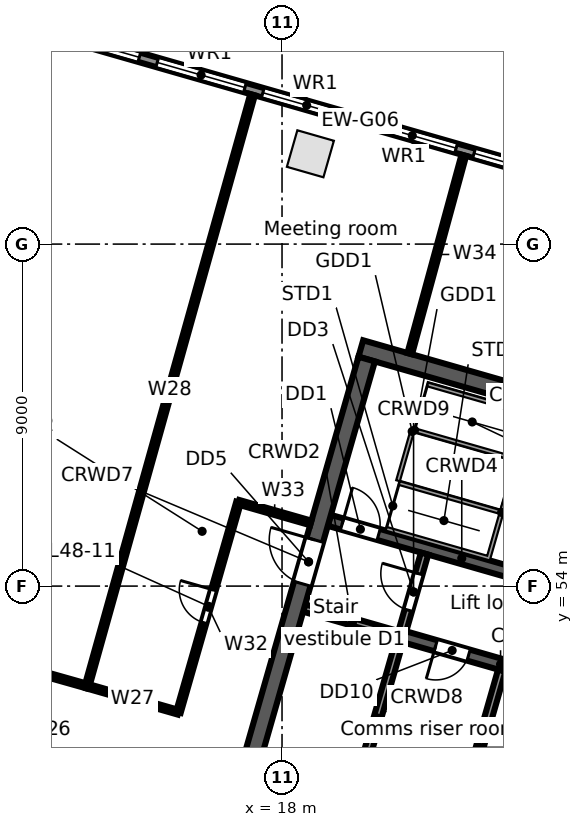
"""IFC4 building model, lengths in metres.
Left out: names, types, materials, properties, quantities, classifications, styles, units other than length and angle.
Written with IfcOpenShell. Run it as: python <this file> out.ifc"""

import sys

from ifc_helpers import new_model, si_unit, direction, frame, frame_2d, origin, origin_2d, place, context, subcontext, project, spatial, rectangle, extrude, element, fill, save


model = new_model("IFC4")
c1 = context("Model", 3, precision=1e-05, world=origin(), true_north=direction((0.0, 1.0)))
c2 = subcontext(c1, "Body", "Model", "MODEL_VIEW")
j1 = project(units=[si_unit("LENGTHUNIT", "METRE"), si_unit("PLANEANGLEUNIT", "RADIAN")], contexts=[c1])
p1 = place(None, origin())
s1 = spatial("IfcSite", under=j1, at=p1, CompositionType="ELEMENT")
p2 = place(p1, origin())
s2 = spatial("IfcBuilding", under=s1, at=p2, CompositionType="ELEMENT")
p3 = place(p2, frame((0.0, 0.0, 223.1)))
s3 = spatial("IfcBuildingStorey", under=s2, at=p3, CompositionType="ELEMENT", Elevation=223.1)
p4 = place(p3, frame((18.746, 65.376, 0.0), z_axis=(0.0, 0.0, 1.0), x_axis=(-0.961261695938, 0.275637355817, 0.0)))
e1 = element("IfcColumn", 1, at=p4, inside=s3, PredefinedType="COLUMN", context=c2, shape_type="SweptSolid", body=[
    extrude(rectangle(XDim=1.0, YDim=1.0, at=origin_2d()), origin(), (0.0, 0.0, 1.0), 3.9),
])
p5 = place(p3, frame((3.34, 71.042, 0.0), z_axis=(0.0, 0.0, 1.0), x_axis=(0.96126179431, -0.275637012753, 0.0)))
e2 = element("IfcWall", 2, at=p5, inside=s3, PredefinedType="STANDARD", context=c2, shape_type="SweptSolid", body=[
    extrude(rectangle(XDim=34.779, YDim=0.25, at=frame_2d((17.39, 0.0))), origin(), (0.0, 0.0, 1.0), 3.62),
])
p6 = place(p5, frame((32.071, 0.0, 0.8)))
e3 = element("IfcOpeningElement", 3, at=p6, cuts=e2, PredefinedType="OPENING", context=c2, shape_type="SweptSolid", body=[
    extrude(rectangle(XDim=2.4, YDim=2.2, at=frame_2d((1.2, 1.1))), frame((0.0, 0.135, 0.0), z_axis=(0.0, -1.0, 0.0), x_axis=(1.0, 0.0, 0.0)), (0.0, 0.0, 1.0), 0.27),
])
p7 = place(p5, frame((29.18, 0.0, 0.8)))
e4 = element("IfcOpeningElement", 4, at=p7, cuts=e2, PredefinedType="OPENING", context=c2, shape_type="SweptSolid", body=[
    extrude(rectangle(XDim=2.4, YDim=2.2, at=frame_2d((1.2, 1.1))), frame((0.0, 0.135, 0.0), z_axis=(0.0, -1.0, 0.0), x_axis=(1.0, 0.0, 0.0)), (0.0, 0.0, 1.0), 0.27),
])
p8 = place(p5, frame((26.289, 0.0, 0.8)))
e5 = element("IfcOpeningElement", 5, at=p8, cuts=e2, PredefinedType="OPENING", context=c2, shape_type="SweptSolid", body=[
    extrude(rectangle(XDim=2.4, YDim=2.2, at=frame_2d((1.2, 1.1))), frame((0.0, 0.135, 0.0), z_axis=(0.0, -1.0, 0.0), x_axis=(1.0, 0.0, 0.0)), (0.0, 0.0, 1.0), 0.27),
])
p9 = place(p5, frame((23.398, 0.0, 0.8)))
e6 = element("IfcOpeningElement", 6, at=p9, cuts=e2, PredefinedType="OPENING", context=c2, shape_type="SweptSolid", body=[
    extrude(rectangle(XDim=2.4, YDim=2.2, at=frame_2d((1.2, 1.1))), frame((0.0, 0.135, 0.0), z_axis=(0.0, -1.0, 0.0), x_axis=(1.0, 0.0, 0.0)), (0.0, 0.0, 1.0), 0.27),
])
p10 = place(p5, frame((20.508, 0.0, 0.8)))
e7 = element("IfcOpeningElement", 7, at=p10, cuts=e2, PredefinedType="OPENING", context=c2, shape_type="SweptSolid", body=[
    extrude(rectangle(XDim=2.4, YDim=2.2, at=frame_2d((1.2, 1.1))), frame((0.0, 0.135, 0.0), z_axis=(0.0, -1.0, 0.0), x_axis=(1.0, 0.0, 0.0)), (0.0, 0.0, 1.0), 0.27),
])
p11 = place(p5, frame((17.616, 0.0, 0.8)))
e8 = element("IfcOpeningElement", 8, at=p11, cuts=e2, PredefinedType="OPENING", context=c2, shape_type="SweptSolid", body=[
    extrude(rectangle(XDim=2.4, YDim=2.2, at=frame_2d((1.2, 1.1))), frame((0.0, 0.135, 0.0), z_axis=(0.0, -1.0, 0.0), x_axis=(1.0, 0.0, 0.0)), (0.0, 0.0, 1.0), 0.27),
])
p12 = place(p5, frame((14.726, 0.0, 0.8)))
e9 = element("IfcOpeningElement", 9, at=p12, cuts=e2, PredefinedType="OPENING", context=c2, shape_type="SweptSolid", body=[
    extrude(rectangle(XDim=2.4, YDim=2.2, at=frame_2d((1.2, 1.1))), frame((0.0, 0.135, 0.0), z_axis=(0.0, -1.0, 0.0), x_axis=(1.0, 0.0, 0.0)), (0.0, 0.0, 1.0), 0.27),
])
p13 = place(p5, frame((11.834, 0.0, 0.8)))
e10 = element("IfcOpeningElement", 10, at=p13, cuts=e2, PredefinedType="OPENING", context=c2, shape_type="SweptSolid", body=[
    extrude(rectangle(XDim=2.4, YDim=2.2, at=frame_2d((1.2, 1.1))), frame((0.0, 0.135, 0.0), z_axis=(0.0, -1.0, 0.0), x_axis=(1.0, 0.0, 0.0)), (0.0, 0.0, 1.0), 0.27),
])
p14 = place(p5, frame((8.944, 0.0, 0.8)))
e11 = element("IfcOpeningElement", 11, at=p14, cuts=e2, PredefinedType="OPENING", context=c2, shape_type="SweptSolid", body=[
    extrude(rectangle(XDim=2.4, YDim=2.2, at=frame_2d((1.2, 1.1))), frame((0.0, 0.135, 0.0), z_axis=(0.0, -1.0, 0.0), x_axis=(1.0, 0.0, 0.0)), (0.0, 0.0, 1.0), 0.27),
])
p15 = place(p5, frame((6.052, 0.0, 0.8)))
e12 = element("IfcOpeningElement", 12, at=p15, cuts=e2, PredefinedType="OPENING", context=c2, shape_type="SweptSolid", body=[
    extrude(rectangle(XDim=2.4, YDim=2.2, at=frame_2d((1.2, 1.1))), frame((0.0, 0.135, 0.0), z_axis=(0.0, -1.0, 0.0), x_axis=(1.0, 0.0, 0.0)), (0.0, 0.0, 1.0), 0.27),
])
p16 = place(p5, frame((3.162, 0.0, 0.8)))
e13 = element("IfcOpeningElement", 13, at=p16, cuts=e2, PredefinedType="OPENING", context=c2, shape_type="SweptSolid", body=[
    extrude(rectangle(XDim=2.4, YDim=2.2, at=frame_2d((1.2, 1.1))), frame((0.0, 0.135, 0.0), z_axis=(0.0, -1.0, 0.0), x_axis=(1.0, 0.0, 0.0)), (0.0, 0.0, 1.0), 0.27),
])
p17 = place(p5, frame((0.271, 0.0, 0.8)))
e14 = element("IfcOpeningElement", 14, at=p17, cuts=e2, PredefinedType="OPENING", context=c2, shape_type="SweptSolid", body=[
    extrude(rectangle(XDim=2.4, YDim=2.2, at=frame_2d((1.2, 1.1))), frame((0.0, 0.135, 0.0), z_axis=(0.0, -1.0, 0.0), x_axis=(1.0, 0.0, 0.0)), (0.0, 0.0, 1.0), 0.27),
])
p18 = place(p3, frame((18.583, 53.423, 0.0), z_axis=(0.0, 0.0, 1.0), x_axis=(0.961259287968, -0.275645753268, 0.0)))
e15 = element("IfcWall", 15, at=p18, inside=s3, PredefinedType="SOLIDWALL", context=c2, shape_type="SweptSolid", body=[
    extrude(rectangle(XDim=2.65, YDim=0.2, at=frame_2d((1.325, 0.0))), origin(), (0.0, 0.0, 1.0), 3.62),
])
p19 = place(p3, frame((21.131, 52.692, 0.0), z_axis=(0.0, 0.0, 1.0), x_axis=(0.961261488075, -0.275638080722, 0.0)))
e16 = element("IfcWall", 16, at=p19, inside=s3, PredefinedType="SOLIDWALL", context=c2, shape_type="SweptSolid", body=[
    extrude(rectangle(XDim=5.45, YDim=0.3, at=frame_2d((2.725, 0.0))), origin(), (0.0, 0.0, 1.0), 3.62),
])
p20 = place(p19, frame((0.95, 0.0, 0.0)))
e17 = element("IfcOpeningElement", 17, at=p20, cuts=e16, PredefinedType="OPENING", context=c2, shape_type="SweptSolid", body=[
    extrude(rectangle(XDim=0.9, YDim=2.1, at=frame_2d((0.45, 1.05))), frame((0.0, 0.16, 0.0), z_axis=(0.0, -1.0, 0.0), x_axis=(1.0, 0.0, 0.0)), (0.0, 0.0, 1.0), 0.32),
])
p21 = place(p19, frame((3.75, 0.0, 0.0)))
e18 = element("IfcOpeningElement", 18, at=p21, cuts=e16, PredefinedType="OPENING", context=c2, shape_type="SweptSolid", body=[
    extrude(rectangle(XDim=0.9, YDim=2.1, at=frame_2d((0.45, 1.05))), frame((0.0, 0.16, 0.0), z_axis=(0.0, -1.0, 0.0), x_axis=(1.0, 0.0, 0.0)), (0.0, 0.0, 1.0), 0.32),
])
p22 = place(p3, frame((19.245, 55.73, 0.0), z_axis=(0.0, 0.0, 1.0), x_axis=(0.961263007877, -0.275632780503, 0.0)))
e19 = element("IfcWall", 19, at=p22, inside=s3, PredefinedType="SOLIDWALL", context=c2, shape_type="SweptSolid", body=[
    extrude(rectangle(XDim=7.25, YDim=0.3, at=frame_2d((3.625, 0.0))), origin(), (0.0, 0.0, 1.0), 3.62),
])
p23 = place(p22, frame((0.35, 0.0, 0.0)))
e20 = element("IfcOpeningElement", 20, at=p23, cuts=e19, PredefinedType="OPENING", context=c2, shape_type="SweptSolid", body=[
    extrude(rectangle(XDim=1.0, YDim=2.1, at=frame_2d((0.5, 1.05))), frame((0.0, 0.16, 0.0), z_axis=(0.0, -1.0, 0.0), x_axis=(1.0, 0.0, 0.0)), (0.0, 0.0, 1.0), 0.32),
])
p24 = place(p3, frame((20.073, 60.252, 0.0), z_axis=(0.0, 0.0, 1.0), x_axis=(0.96126248289, -0.275634611374, 0.0)))
e21 = element("IfcWall", 21, at=p24, inside=s3, PredefinedType="SOLIDWALL", context=c2, shape_type="SweptSolid", body=[
    extrude(rectangle(XDim=9.0, YDim=0.45, at=frame_2d((4.5, 0.0))), origin(), (0.0, 0.0, 1.0), 3.62),
])
p25 = place(p3, frame((17.168, 49.303, 0.0), z_axis=(0.0, 0.0, 1.0), x_axis=(0.275638974822, 0.961261231695, 0.0)))
e22 = element("IfcWall", 22, at=p25, inside=s3, PredefinedType="SOLIDWALL", context=c2, shape_type="SweptSolid", body=[
    extrude(rectangle(XDim=11.1, YDim=0.45, at=frame_2d((5.55, 0.0))), origin(), (0.0, 0.0, 1.0), 3.62),
])
p26 = place(p25, frame((4.95, 0.0, 0.0)))
e23 = element("IfcOpeningElement", 23, at=p26, cuts=e22, PredefinedType="OPENING", context=c2, shape_type="SweptSolid", body=[
    extrude(rectangle(XDim=1.2, YDim=2.1, at=frame_2d((0.6, 1.05))), frame((0.0, 0.235, 0.0), z_axis=(0.0, -1.0, 0.0), x_axis=(1.0, 0.0, 0.0)), (0.0, 0.0, 1.0), 0.47),
])
p27 = place(p3, frame((19.932, 48.511, 0.0), z_axis=(0.0, 0.0, 1.0), x_axis=(0.275642273411, 0.961260285827, 0.0)))
e24 = element("IfcWall", 24, at=p27, inside=s3, PredefinedType="SOLIDWALL", context=c2, shape_type="SweptSolid", body=[
    extrude(rectangle(XDim=4.2, YDim=0.2, at=frame_2d((2.1, 0.0))), origin(), (0.0, 0.0, 1.0), 3.62),
])
p28 = place(p3, frame((21.172, 52.837, 0.0), z_axis=(0.0, 0.0, 1.0), x_axis=(0.275657676022, 0.961255868981, 0.0)))
e25 = element("IfcWall", 25, at=p28, inside=s3, PredefinedType="PARTITIONING", context=c2, shape_type="SweptSolid", body=[
    extrude(rectangle(XDim=2.1, YDim=0.2, at=frame_2d((1.05, 0.0))), origin(), (0.0, 0.0, 1.0), 3.62),
])
p29 = place(p28, frame((0.55, 0.0, 0.0)))
e26 = element("IfcOpeningElement", 26, at=p29, cuts=e25, PredefinedType="OPENING", context=c2, shape_type="SweptSolid", body=[
    extrude(rectangle(XDim=1.0, YDim=2.1, at=frame_2d((0.5, 1.05))), frame((0.0, 0.11, 0.0), z_axis=(0.0, -1.0, 0.0), x_axis=(1.0, 0.0, 0.0)), (0.0, 0.0, 1.0), 0.22),
])
p30 = place(p3, frame((22.623, 47.739, 0.0), z_axis=(0.0, 0.0, 1.0), x_axis=(0.275642273411, 0.961260285827, 0.0)))
e27 = element("IfcWall", 27, at=p30, inside=s3, PredefinedType="PARTITIONING", context=c2, shape_type="SweptSolid", body=[
    extrude(rectangle(XDim=4.2, YDim=0.2, at=frame_2d((2.1, 0.0))), origin(), (0.0, 0.0, 1.0), 3.62),
])
p31 = place(p3, frame((0.0, 55.0, 0.0), z_axis=(0.0, 0.0, 1.0), x_axis=(0.962402937884, -0.271625818271, 0.0)))
e28 = element("IfcWall", 28, at=p31, inside=s3, PredefinedType="PARTITIONING", context=c2, shape_type="SweptSolid", body=[
    extrude(rectangle(XDim=13.372, YDim=0.125, at=frame_2d((6.686, 0.0))), origin(), (0.0, 0.0, 1.0), 2.8),
])
p32 = place(p31, frame((5.7, 0.0, 0.0)))
e29 = element("IfcOpeningElement", 29, at=p32, cuts=e28, PredefinedType="OPENING", context=c2, shape_type="SweptSolid", body=[
    extrude(rectangle(XDim=1.8, YDim=2.1, at=frame_2d((0.9, 1.05))), frame((0.0, 0.073, 0.0), z_axis=(0.0, -1.0, 0.0), x_axis=(1.0, 0.0, 0.0)), (0.0, 0.0, 1.0), 0.145),
])
p33 = place(p3, frame((6.482, 50.859, 0.0), z_axis=(0.0, 0.0, 1.0), x_axis=(0.961261196169, -0.275639098713, 0.0)))
e30 = element("IfcWall", 30, at=p33, inside=s3, PredefinedType="PARTITIONING", context=c2, shape_type="SweptSolid", body=[
    extrude(rectangle(XDim=8.5, YDim=0.125, at=frame_2d((4.25, 0.0))), origin(), (0.0, 0.0, 1.0), 2.8),
])
p34 = place(p33, frame((3.7, 0.0, 0.0)))
e31 = element("IfcOpeningElement", 31, at=p34, cuts=e30, PredefinedType="OPENING", context=c2, shape_type="SweptSolid", body=[
    extrude(rectangle(XDim=0.9, YDim=2.1, at=frame_2d((0.45, 1.05))), frame((0.0, 0.073, 0.0), z_axis=(0.0, -1.0, 0.0), x_axis=(1.0, 0.0, 0.0)), (0.0, 0.0, 1.0), 0.145),
])
p35 = place(p3, frame((12.869, 51.368, 0.0), z_axis=(0.0, 0.0, 1.0), x_axis=(0.961302601161, -0.275494662382, 0.0)))
e32 = element("IfcWall", 32, at=p35, inside=s3, PredefinedType="PARTITIONING", context=c2, shape_type="SweptSolid", body=[
    extrude(rectangle(XDim=2.501, YDim=0.125, at=frame_2d((1.25, 0.0))), origin(), (0.0, 0.0, 1.0), 3.62),
])
p36 = place(p3, frame((12.869, 51.368, 0.0), z_axis=(0.0, 0.0, 1.0), x_axis=(0.269547555311, 0.962987079574, 0.0)))
e33 = element("IfcWall", 33, at=p36, inside=s3, PredefinedType="PARTITIONING", context=c2, shape_type="SweptSolid", body=[
    extrude(rectangle(XDim=16.161, YDim=0.125, at=frame_2d((8.081, 0.0))), origin(), (0.0, 0.0, 1.0), 2.792),
])
p37 = place(p3, frame((15.273, 50.679, 0.0), z_axis=(0.0, 0.0, 1.0), x_axis=(0.275494973205, 0.961302512084, 0.0)))
e34 = element("IfcWall", 34, at=p37, inside=s3, PredefinedType="PARTITIONING", context=c2, shape_type="SweptSolid", body=[
    extrude(rectangle(XDim=5.75, YDim=0.125, at=frame_2d((2.875, 0.0))), origin(), (0.0, 0.0, 1.0), 2.8),
])
p38 = place(p37, frame((2.45, 0.0, 0.0)))
e35 = element("IfcOpeningElement", 35, at=p38, cuts=e34, PredefinedType="OPENING", context=c2, shape_type="SweptSolid", body=[
    extrude(rectangle(XDim=0.9, YDim=2.1, at=frame_2d((0.45, 1.05))), frame((0.0, 0.073, 0.0), z_axis=(0.0, -1.0, 0.0), x_axis=(1.0, 0.0, 0.0)), (0.0, 0.0, 1.0), 0.145),
])
p39 = place(p3, frame((16.857, 56.206, 0.0), z_axis=(0.0, 0.0, 1.0), x_axis=(0.961383985066, -0.275210525341, 0.0)))
e36 = element("IfcWall", 36, at=p39, inside=s3, PredefinedType="PARTITIONING", context=c2, shape_type="SweptSolid", body=[
    extrude(rectangle(XDim=1.977, YDim=0.125, at=frame_2d((0.988, 0.0))), origin(), (0.0, 0.0, 1.0), 3.62),
])
p40 = place(p3, frame((21.36, 60.117, 0.0), z_axis=(0.0, 0.0, 1.0), x_axis=(0.263151767798, 0.964754449124, 0.0)))
e37 = element("IfcWall", 37, at=p40, inside=s3, PredefinedType="PARTITIONING", context=c2, shape_type="SweptSolid", body=[
    extrude(rectangle(XDim=5.411, YDim=0.125, at=frame_2d((2.705, 0.0))), origin(), (0.0, 0.0, 1.0), 3.0),
])
p41 = place(p10, origin())
e38 = element("IfcWindow", 38, at=p41, inside=s3, PartitioningType="SINGLE_PANEL", PredefinedType="WINDOW", context=c2, shape_type="SweptSolid", body=[
    extrude(rectangle(XDim=2.4, YDim=2.2, at=frame_2d((1.2, 1.1))), frame((0.0, 0.03, 0.0), z_axis=(0.0, -1.0, 0.0), x_axis=(1.0, 0.0, 0.0)), (0.0, 0.0, 1.0), 0.06),
])
fill(e7, e38)
p42 = place(p11, origin())
e39 = element("IfcWindow", 39, at=p42, inside=s3, PartitioningType="SINGLE_PANEL", PredefinedType="WINDOW", context=c2, shape_type="SweptSolid", body=[
    extrude(rectangle(XDim=2.4, YDim=2.2, at=frame_2d((1.2, 1.1))), frame((0.0, 0.03, 0.0), z_axis=(0.0, -1.0, 0.0), x_axis=(1.0, 0.0, 0.0)), (0.0, 0.0, 1.0), 0.06),
])
fill(e8, e39)
p43 = place(p12, origin())
e40 = element("IfcWindow", 40, at=p43, inside=s3, PartitioningType="SINGLE_PANEL", PredefinedType="WINDOW", context=c2, shape_type="SweptSolid", body=[
    extrude(rectangle(XDim=2.4, YDim=2.2, at=frame_2d((1.2, 1.1))), frame((0.0, 0.03, 0.0), z_axis=(0.0, -1.0, 0.0), x_axis=(1.0, 0.0, 0.0)), (0.0, 0.0, 1.0), 0.06),
])
fill(e9, e40)
p44 = place(p13, origin())
e41 = element("IfcWindow", 41, at=p44, inside=s3, PartitioningType="SINGLE_PANEL", PredefinedType="WINDOW", context=c2, shape_type="SweptSolid", body=[
    extrude(rectangle(XDim=2.4, YDim=2.2, at=frame_2d((1.2, 1.1))), frame((0.0, 0.03, 0.0), z_axis=(0.0, -1.0, 0.0), x_axis=(1.0, 0.0, 0.0)), (0.0, 0.0, 1.0), 0.06),
])
fill(e10, e41)
p45 = place(p14, origin())
e42 = element("IfcWindow", 42, at=p45, inside=s3, PartitioningType="SINGLE_PANEL", PredefinedType="WINDOW", context=c2, shape_type="SweptSolid", body=[
    extrude(rectangle(XDim=2.4, YDim=2.2, at=frame_2d((1.2, 1.1))), frame((0.0, 0.03, 0.0), z_axis=(0.0, -1.0, 0.0), x_axis=(1.0, 0.0, 0.0)), (0.0, 0.0, 1.0), 0.06),
])
fill(e11, e42)
p46 = place(p23, origin())
e43 = element("IfcDoor", 43, at=p46, inside=s3, OperationType="SINGLE_SWING_LEFT", PredefinedType="DOOR", context=c2, shape_type="SweptSolid", body=[
    extrude(rectangle(XDim=1.0, YDim=2.1, at=frame_2d((0.5, 1.05))), frame((0.0, 0.025, 0.0), z_axis=(0.0, -1.0, 0.0), x_axis=(1.0, 0.0, 0.0)), (0.0, 0.0, 1.0), 0.05),
])
fill(e20, e43)
p47 = place(p29, origin())
e44 = element("IfcDoor", 44, at=p47, inside=s3, OperationType="SINGLE_SWING_RIGHT", PredefinedType="DOOR", context=c2, shape_type="SweptSolid", body=[
    extrude(rectangle(XDim=1.0, YDim=2.1, at=frame_2d((0.5, 1.05))), frame((0.0, 0.025, 0.0), z_axis=(0.0, -1.0, 0.0), x_axis=(1.0, 0.0, 0.0)), (0.0, 0.0, 1.0), 0.05),
])
fill(e26, e44)
p48 = place(p26, origin())
e45 = element("IfcDoor", 45, at=p48, inside=s3, OperationType="SINGLE_SWING_RIGHT", PredefinedType="DOOR", context=c2, shape_type="SweptSolid", body=[
    extrude(rectangle(XDim=1.2, YDim=2.1, at=frame_2d((0.6, 1.05))), frame((0.0, 0.025, 0.0), z_axis=(0.0, -1.0, 0.0), x_axis=(1.0, 0.0, 0.0)), (0.0, 0.0, 1.0), 0.05),
])
fill(e23, e45)
p49 = place(p20, frame((0.9, 0.0, 0.0), z_axis=(0.0, 0.0, 1.0), x_axis=(-1.0, 0.0, 0.0)))
e46 = element("IfcDoor", 46, at=p49, inside=s3, OperationType="SINGLE_SWING_RIGHT", PredefinedType="DOOR", context=c2, shape_type="SweptSolid", body=[
    extrude(rectangle(XDim=0.9, YDim=2.1, at=frame_2d((0.45, 1.05))), frame((0.0, 0.025, 0.0), z_axis=(0.0, -1.0, 0.0), x_axis=(1.0, 0.0, 0.0)), (0.0, 0.0, 1.0), 0.05),
])
fill(e17, e46)
p50 = place(p38, origin())
e47 = element("IfcDoor", 47, at=p50, inside=s3, OperationType="SINGLE_SWING_RIGHT", PredefinedType="DOOR", context=c2, shape_type="SweptSolid", body=[
    extrude(rectangle(XDim=0.9, YDim=2.1, at=frame_2d((0.45, 1.05))), frame((0.0, 0.025, 0.0), z_axis=(0.0, -1.0, 0.0), x_axis=(1.0, 0.0, 0.0)), (0.0, 0.0, 1.0), 0.05),
])
fill(e35, e47)
save(model, sys.argv[1])
